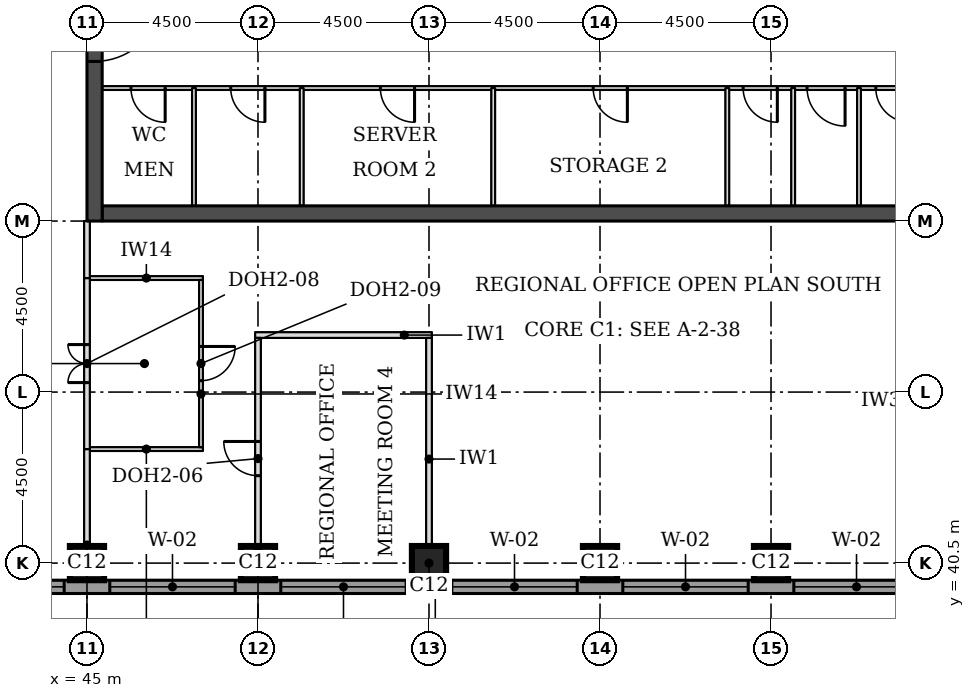
"""IFC4 building model, lengths in metres.
Left out: names, types, materials, properties, quantities, classifications, styles, units other than length and angle.
Written with IfcOpenShell. Run it as: python <this file> out.ifc"""

import sys

from ifc_helpers import new_model, si_unit, direction, frame, frame_2d, origin, origin_2d, place, context, subcontext, project, spatial, rectangle, extrude, element, fill, save


model = new_model("IFC4")
c1 = context("Model", 3, precision=1e-05, world=origin(), true_north=direction((0.0, 1.0)))
c2 = subcontext(c1, "Body", "Model", "MODEL_VIEW")
j1 = project(units=[si_unit("LENGTHUNIT", "METRE"), si_unit("PLANEANGLEUNIT", "RADIAN")], contexts=[c1])
p1 = place(None, origin())
s1 = spatial("IfcSite", under=j1, at=p1, CompositionType="ELEMENT")
p2 = place(p1, origin())
s2 = spatial("IfcBuilding", under=s1, at=p2, CompositionType="ELEMENT")
p3 = place(p2, frame((0.0, 0.0, 155.1)))
s3 = spatial("IfcBuildingStorey", under=s2, at=p3, CompositionType="ELEMENT", Elevation=155.1)
for number, where, z_axis, x_axis in (
    (1, (45.0, 40.5, 0.0), (0.0, 0.0, 1.0), (1.0, 0.0, 0.0)),
    (2, (49.5, 40.5, 0.0), (0.0, 0.0, 1.0), (1.0, 0.0, 0.0)),
    (3, (54.0, 40.5, 0.0), (0.0, 0.0, 1.0), (1.0, 0.0, 0.0)),
    (4, (58.5, 40.5, 0.0), (0.0, 0.0, 1.0), (1.0, 0.0, 0.0)),
    (5, (63.0, 40.5, 0.0), (0.0, 0.0, 1.0), (1.0, 0.0, 0.0)),
):
    element("IfcColumn", number, at=place(p3, frame(where, z_axis=z_axis, x_axis=x_axis)), inside=s3, PredefinedType="COLUMN", context=c2, shape_type="SweptSolid", body=[
        extrude(rectangle(XDim=0.9, YDim=0.9, at=origin_2d()), origin(), (0.0, 0.0, 1.0), 3.7),
    ])
p4 = place(p3, frame((45.4, 49.7, 0.0), z_axis=(0.0, 0.0, 1.0), x_axis=(1.0, 0.0, 0.0)))
e6 = element("IfcWall", 6, at=p4, inside=s3, PredefinedType="SHEAR", context=c2, shape_type="SweptSolid", body=[
    extrude(rectangle(XDim=21.7, YDim=0.4, at=frame_2d((10.85, 0.0))), origin(), (0.0, 0.0, 1.0), 3.7),
])
p5 = place(p3, frame((45.2, 49.5, 0.0), z_axis=(0.0, 0.0, 1.0), x_axis=(0.0, 1.0, 0.0)))
e7 = element("IfcWall", 7, at=p5, inside=s3, PredefinedType="SHEAR", context=c2, shape_type="SweptSolid", body=[
    extrude(rectangle(XDim=22.5, YDim=0.4, at=frame_2d((11.25, 0.0))), origin(), (0.0, 0.0, 1.0), 3.7),
])
p6 = place(p5, frame((4.2, 0.0, 0.0)))
e8 = element("IfcOpeningElement", 8, at=p6, cuts=e7, PredefinedType="OPENING", context=c2, shape_type="SweptSolid", body=[
    extrude(rectangle(XDim=1.8, YDim=2.1, at=frame_2d((0.9, 1.05))), frame((0.0, 0.21, 0.0), z_axis=(0.0, -1.0, 0.0), x_axis=(1.0, 0.0, 0.0)), (0.0, 0.0, 1.0), 0.42),
])
p7 = place(p5, frame((6.9, 0.0, 0.0)))
e9 = element("IfcOpeningElement", 9, at=p7, cuts=e7, PredefinedType="OPENING", context=c2, shape_type="SweptSolid", body=[
    extrude(rectangle(XDim=1.1, YDim=2.1, at=frame_2d((0.55, 1.05))), frame((0.0, 0.21, 0.0), z_axis=(0.0, -1.0, 0.0), x_axis=(1.0, 0.0, 0.0)), (0.0, 0.0, 1.0), 0.42),
])
p8 = place(p5, frame((13.6, 0.0, 0.0)))
e10 = element("IfcOpeningElement", 10, at=p8, cuts=e7, PredefinedType="OPENING", context=c2, shape_type="SweptSolid", body=[
    extrude(rectangle(XDim=1.1, YDim=2.1, at=frame_2d((0.55, 1.05))), frame((0.0, 0.21, 0.0), z_axis=(0.0, -1.0, 0.0), x_axis=(1.0, 0.0, 0.0)), (0.0, 0.0, 1.0), 0.42),
])
p9 = place(p5, frame((16.5, 0.0, 0.0)))
e11 = element("IfcOpeningElement", 11, at=p9, cuts=e7, PredefinedType="OPENING", context=c2, shape_type="SweptSolid", body=[
    extrude(rectangle(XDim=1.8, YDim=2.1, at=frame_2d((0.9, 1.05))), frame((0.0, 0.21, 0.0), z_axis=(0.0, -1.0, 0.0), x_axis=(1.0, 0.0, 0.0)), (0.0, 0.0, 1.0), 0.42),
])
p10 = place(p3, frame((36.0, 39.875, 0.0), z_axis=(0.0, 0.0, 1.0), x_axis=(1.0, 0.0, 0.0)))
e12 = element("IfcWall", 12, at=p10, inside=s3, PredefinedType="STANDARD", context=c2, shape_type="SweptSolid", body=[
    extrude(rectangle(XDim=36.331, YDim=0.35, at=frame_2d((18.166, 0.0))), origin(), (0.0, 0.0, 1.0), 3.525),
])
p11 = place(p10, frame((5.1, 0.0, 0.9)))
e13 = element("IfcOpeningElement", 13, at=p11, cuts=e12, PredefinedType="OPENING", context=c2, shape_type="SweptSolid", body=[
    extrude(rectangle(XDim=3.3, YDim=1.9, at=frame_2d((1.65, 0.95))), frame((0.0, 0.185, 0.0), z_axis=(0.0, -1.0, 0.0), x_axis=(1.0, 0.0, 0.0)), (0.0, 0.0, 1.0), 0.37),
])
p12 = place(p10, frame((9.6, 0.0, 0.9)))
e14 = element("IfcOpeningElement", 14, at=p12, cuts=e12, PredefinedType="OPENING", context=c2, shape_type="SweptSolid", body=[
    extrude(rectangle(XDim=3.3, YDim=1.9, at=frame_2d((1.65, 0.95))), frame((0.0, 0.185, 0.0), z_axis=(0.0, -1.0, 0.0), x_axis=(1.0, 0.0, 0.0)), (0.0, 0.0, 1.0), 0.37),
])
p13 = place(p10, frame((14.1, 0.0, 0.9)))
e15 = element("IfcOpeningElement", 15, at=p13, cuts=e12, PredefinedType="OPENING", context=c2, shape_type="SweptSolid", body=[
    extrude(rectangle(XDim=3.3, YDim=1.9, at=frame_2d((1.65, 0.95))), frame((0.0, 0.185, 0.0), z_axis=(0.0, -1.0, 0.0), x_axis=(1.0, 0.0, 0.0)), (0.0, 0.0, 1.0), 0.37),
])
p14 = place(p10, frame((18.6, 0.0, 0.9)))
e16 = element("IfcOpeningElement", 16, at=p14, cuts=e12, PredefinedType="OPENING", context=c2, shape_type="SweptSolid", body=[
    extrude(rectangle(XDim=3.3, YDim=1.9, at=frame_2d((1.65, 0.95))), frame((0.0, 0.185, 0.0), z_axis=(0.0, -1.0, 0.0), x_axis=(1.0, 0.0, 0.0)), (0.0, 0.0, 1.0), 0.37),
])
p15 = place(p10, frame((23.1, 0.0, 0.9)))
e17 = element("IfcOpeningElement", 17, at=p15, cuts=e12, PredefinedType="OPENING", context=c2, shape_type="SweptSolid", body=[
    extrude(rectangle(XDim=3.3, YDim=1.9, at=frame_2d((1.65, 0.95))), frame((0.0, 0.185, 0.0), z_axis=(0.0, -1.0, 0.0), x_axis=(1.0, 0.0, 0.0)), (0.0, 0.0, 1.0), 0.37),
])
p16 = place(p10, frame((27.6, 0.0, 0.9)))
e18 = element("IfcOpeningElement", 18, at=p16, cuts=e12, PredefinedType="OPENING", context=c2, shape_type="SweptSolid", body=[
    extrude(rectangle(XDim=3.3, YDim=1.9, at=frame_2d((1.65, 0.95))), frame((0.0, 0.185, 0.0), z_axis=(0.0, -1.0, 0.0), x_axis=(1.0, 0.0, 0.0)), (0.0, 0.0, 1.0), 0.37),
])
p17 = place(p3, frame((45.075, 43.5, 0.0), z_axis=(0.0, 0.0, 1.0), x_axis=(1.0, 0.0, 0.0)))
e19 = element("IfcWall", 19, at=p17, inside=s3, PredefinedType="PARTITIONING", context=c2, shape_type="SweptSolid", body=[
    extrude(rectangle(XDim=2.975, YDim=0.1, at=frame_2d((1.488, 0.0))), origin(), (0.0, 0.0, 1.0), 3.55),
])
p18 = place(p3, frame((49.425, 46.5, 0.0), z_axis=(0.0, 0.0, 1.0), x_axis=(1.0, 0.0, 0.0)))
e20 = element("IfcWall", 20, at=p18, inside=s3, PredefinedType="PARTITIONING", context=c2, shape_type="SweptSolid", body=[
    extrude(rectangle(XDim=4.65, YDim=0.15, at=frame_2d((2.325, 0.0))), origin(), (0.0, 0.0, 1.0), 3.55),
])
p19 = place(p3, frame((45.075, 48.0, 0.0), z_axis=(0.0, 0.0, 1.0), x_axis=(1.0, 0.0, 0.0)))
e21 = element("IfcWall", 21, at=p19, inside=s3, PredefinedType="PARTITIONING", context=c2, shape_type="SweptSolid", body=[
    extrude(rectangle(XDim=2.975, YDim=0.1, at=frame_2d((1.488, 0.0))), origin(), (0.0, 0.0, 1.0), 3.55),
])
p20 = place(p3, frame((45.0, 40.05, 0.0), z_axis=(0.0, 0.0, 1.0), x_axis=(0.0, 1.0, 0.0)))
e22 = element("IfcWall", 22, at=p20, inside=s3, PredefinedType="PARTITIONING", context=c2, shape_type="SweptSolid", body=[
    extrude(rectangle(XDim=3.45, YDim=0.15, at=frame_2d((1.725, 0.0))), origin(), (0.0, 0.0, 1.0), 3.022),
])
p21 = place(p3, frame((49.5, 40.05, 0.0), z_axis=(0.0, 0.0, 1.0), x_axis=(0.0, 1.0, 0.0)))
e23 = element("IfcWall", 23, at=p21, inside=s3, PredefinedType="PARTITIONING", context=c2, shape_type="SweptSolid", body=[
    extrude(rectangle(XDim=6.375, YDim=0.15, at=frame_2d((3.188, 0.0))), origin(), (0.0, 0.0, 1.0), 3.55),
])
p22 = place(p21, frame((2.75, 0.0, 0.0)))
e24 = element("IfcOpeningElement", 24, at=p22, cuts=e23, PredefinedType="OPENING", context=c2, shape_type="SweptSolid", body=[
    extrude(rectangle(XDim=0.9, YDim=2.1, at=frame_2d((0.45, 1.05))), frame((0.0, 0.085, 0.0), z_axis=(0.0, -1.0, 0.0), x_axis=(1.0, 0.0, 0.0)), (0.0, 0.0, 1.0), 0.17),
])
p23 = place(p3, frame((54.0, 40.05, 0.0), z_axis=(0.0, 0.0, 1.0), x_axis=(0.0, 1.0, 0.0)))
e25 = element("IfcWall", 25, at=p23, inside=s3, PredefinedType="PARTITIONING", context=c2, shape_type="SweptSolid", body=[
    extrude(rectangle(XDim=6.375, YDim=0.15, at=frame_2d((3.188, 0.0))), origin(), (0.0, 0.0, 1.0), 3.55),
])
p24 = place(p3, frame((45.0, 43.5, 0.0), z_axis=(0.0, 0.0, 1.0), x_axis=(0.0, 1.0, 0.0)))
e26 = element("IfcWall", 26, at=p24, inside=s3, PredefinedType="PARTITIONING", context=c2, shape_type="SweptSolid", body=[
    extrude(rectangle(XDim=4.5, YDim=0.15, at=frame_2d((2.25, 0.0))), origin(), (0.0, 0.0, 1.0), 3.022),
])
p25 = place(p24, frame((1.75, 0.0, 0.0)))
e27 = element("IfcOpeningElement", 27, at=p25, cuts=e26, PredefinedType="OPENING", context=c2, shape_type="SweptSolid", body=[
    extrude(rectangle(XDim=1.0, YDim=2.1, at=frame_2d((0.5, 1.05))), frame((0.0, 0.085, 0.0), z_axis=(0.0, -1.0, 0.0), x_axis=(1.0, 0.0, 0.0)), (0.0, 0.0, 1.0), 0.17),
])
p26 = place(p3, frame((48.0, 43.55, 0.0), z_axis=(0.0, 0.0, 1.0), x_axis=(0.0, 1.0, 0.0)))
e28 = element("IfcWall", 28, at=p26, inside=s3, PredefinedType="PARTITIONING", context=c2, shape_type="SweptSolid", body=[
    extrude(rectangle(XDim=4.4, YDim=0.1, at=frame_2d((2.2, 0.0))), origin(), (0.0, 0.0, 1.0), 3.55),
])
p27 = place(p26, frame((1.75, 0.0, 0.0)))
e29 = element("IfcOpeningElement", 29, at=p27, cuts=e28, PredefinedType="OPENING", context=c2, shape_type="SweptSolid", body=[
    extrude(rectangle(XDim=0.9, YDim=2.1, at=frame_2d((0.45, 1.05))), frame((0.0, 0.06, 0.0), z_axis=(0.0, -1.0, 0.0), x_axis=(1.0, 0.0, 0.0)), (0.0, 0.0, 1.0), 0.12),
])
p28 = place(p3, frame((45.0, 48.0, 0.0), z_axis=(0.0, 0.0, 1.0), x_axis=(0.0, 1.0, 0.0)))
e30 = element("IfcWall", 30, at=p28, inside=s3, PredefinedType="PARTITIONING", context=c2, shape_type="SweptSolid", body=[
    extrude(rectangle(XDim=1.5, YDim=0.15, at=frame_2d((0.75, 0.0))), origin(), (0.0, 0.0, 1.0), 3.022),
])
p29 = place(p3, frame((45.4, 53.0, 0.0), z_axis=(0.0, 0.0, 1.0), x_axis=(1.0, 0.0, 0.0)))
e31 = element("IfcWall", 31, at=p29, inside=s3, PredefinedType="PARTITIONING", context=c2, shape_type="SweptSolid", body=[
    extrude(rectangle(XDim=21.7, YDim=0.1, at=frame_2d((10.85, 0.0))), origin(), (0.0, 0.0, 1.0), 3.55),
])
p30 = place(p29, frame((20.357, 0.0, 0.0)))
e32 = element("IfcOpeningElement", 32, at=p30, cuts=e31, PredefinedType="OPENING", context=c2, shape_type="SweptSolid", body=[
    extrude(rectangle(XDim=0.9, YDim=2.1, at=frame_2d((0.45, 1.05))), frame((0.0, 0.06, 0.0), z_axis=(0.0, -1.0, 0.0), x_axis=(1.0, 0.0, 0.0)), (0.0, 0.0, 1.0), 0.12),
])
p31 = place(p29, frame((18.549, 0.0, 0.0)))
e33 = element("IfcOpeningElement", 33, at=p31, cuts=e31, PredefinedType="OPENING", context=c2, shape_type="SweptSolid", body=[
    extrude(rectangle(XDim=1.0, YDim=2.1, at=frame_2d((0.5, 1.05))), frame((0.0, 0.06, 0.0), z_axis=(0.0, -1.0, 0.0), x_axis=(1.0, 0.0, 0.0)), (0.0, 0.0, 1.0), 0.12),
])
p32 = place(p29, frame((16.866, 0.0, 0.0)))
e34 = element("IfcOpeningElement", 34, at=p32, cuts=e31, PredefinedType="OPENING", context=c2, shape_type="SweptSolid", body=[
    extrude(rectangle(XDim=0.9, YDim=2.1, at=frame_2d((0.45, 1.05))), frame((0.0, 0.06, 0.0), z_axis=(0.0, -1.0, 0.0), x_axis=(1.0, 0.0, 0.0)), (0.0, 0.0, 1.0), 0.12),
])
p33 = place(p29, frame((0.758, 0.0, 0.0)))
e35 = element("IfcOpeningElement", 35, at=p33, cuts=e31, PredefinedType="OPENING", context=c2, shape_type="SweptSolid", body=[
    extrude(rectangle(XDim=0.9, YDim=2.1, at=frame_2d((0.45, 1.05))), frame((0.0, 0.06, 0.0), z_axis=(0.0, -1.0, 0.0), x_axis=(1.0, 0.0, 0.0)), (0.0, 0.0, 1.0), 0.12),
])
p34 = place(p29, frame((3.383, 0.0, 0.0)))
e36 = element("IfcOpeningElement", 36, at=p34, cuts=e31, PredefinedType="OPENING", context=c2, shape_type="SweptSolid", body=[
    extrude(rectangle(XDim=0.9, YDim=2.1, at=frame_2d((0.45, 1.05))), frame((0.0, 0.06, 0.0), z_axis=(0.0, -1.0, 0.0), x_axis=(1.0, 0.0, 0.0)), (0.0, 0.0, 1.0), 0.12),
])
p35 = place(p29, frame((7.32, 0.0, 0.0)))
e37 = element("IfcOpeningElement", 37, at=p35, cuts=e31, PredefinedType="OPENING", context=c2, shape_type="SweptSolid", body=[
    extrude(rectangle(XDim=0.9, YDim=2.1, at=frame_2d((0.45, 1.05))), frame((0.0, 0.06, 0.0), z_axis=(0.0, -1.0, 0.0), x_axis=(1.0, 0.0, 0.0)), (0.0, 0.0, 1.0), 0.12),
])
p36 = place(p29, frame((12.92, 0.0, 0.0)))
e38 = element("IfcOpeningElement", 38, at=p36, cuts=e31, PredefinedType="OPENING", context=c2, shape_type="SweptSolid", body=[
    extrude(rectangle(XDim=0.9, YDim=2.1, at=frame_2d((0.45, 1.05))), frame((0.0, 0.06, 0.0), z_axis=(0.0, -1.0, 0.0), x_axis=(1.0, 0.0, 0.0)), (0.0, 0.0, 1.0), 0.12),
])
for number, where, z_axis, x_axis in (
    (39, (47.815, 49.9, 0.0), (0.0, 0.0, 1.0), (0.0, 1.0, 0.0)),
    (40, (50.65, 49.9, 0.0), (0.0, 0.0, 1.0), (0.0, 1.0, 0.0)),
    (41, (55.69, 49.9, 0.0), (0.0, 0.0, 1.0), (0.0, 1.0, 0.0)),
    (42, (61.85, 49.9, 0.0), (0.0, 0.0, 1.0), (0.0, 1.0, 0.0)),
    (43, (63.583, 49.9, 0.0), (0.0, 0.0, 1.0), (0.0, 1.0, 0.0)),
    (44, (65.315, 49.9, 0.0), (0.0, 0.0, 1.0), (0.0, 1.0, 0.0)),
):
    element("IfcWall", number, at=place(p3, frame(where, z_axis=z_axis, x_axis=x_axis)), inside=s3, PredefinedType="PARTITIONING", context=c2, shape_type="SweptSolid", body=[
        extrude(rectangle(XDim=3.1, YDim=0.1, at=frame_2d((1.55, 0.0))), origin(), (0.0, 0.0, 1.0), 3.55),
    ])
p37 = place(p11, origin())
e45 = element("IfcWindow", 45, at=p37, inside=s3, PartitioningType="SINGLE_PANEL", PredefinedType="WINDOW", context=c2, shape_type="SweptSolid", body=[
    extrude(rectangle(XDim=3.3, YDim=1.9, at=frame_2d((1.65, 0.95))), frame((0.0, 0.085, 0.0), z_axis=(0.0, -1.0, 0.0), x_axis=(1.0, 0.0, 0.0)), (0.0, 0.0, 1.0), 0.06),
])
fill(e13, e45)
p38 = place(p12, origin())
e46 = element("IfcWindow", 46, at=p38, inside=s3, PartitioningType="SINGLE_PANEL", PredefinedType="WINDOW", context=c2, shape_type="SweptSolid", body=[
    extrude(rectangle(XDim=3.3, YDim=1.9, at=frame_2d((1.65, 0.95))), frame((0.0, 0.085, 0.0), z_axis=(0.0, -1.0, 0.0), x_axis=(1.0, 0.0, 0.0)), (0.0, 0.0, 1.0), 0.06),
])
fill(e14, e46)
p39 = place(p13, origin())
e47 = element("IfcWindow", 47, at=p39, inside=s3, PartitioningType="SINGLE_PANEL", PredefinedType="WINDOW", context=c2, shape_type="SweptSolid", body=[
    extrude(rectangle(XDim=3.3, YDim=1.9, at=frame_2d((1.65, 0.95))), frame((0.0, 0.085, 0.0), z_axis=(0.0, -1.0, 0.0), x_axis=(1.0, 0.0, 0.0)), (0.0, 0.0, 1.0), 0.06),
])
fill(e15, e47)
p40 = place(p14, origin())
e48 = element("IfcWindow", 48, at=p40, inside=s3, PartitioningType="SINGLE_PANEL", PredefinedType="WINDOW", context=c2, shape_type="SweptSolid", body=[
    extrude(rectangle(XDim=3.3, YDim=1.9, at=frame_2d((1.65, 0.95))), frame((0.0, 0.085, 0.0), z_axis=(0.0, -1.0, 0.0), x_axis=(1.0, 0.0, 0.0)), (0.0, 0.0, 1.0), 0.06),
])
fill(e16, e48)
p41 = place(p15, origin())
e49 = element("IfcWindow", 49, at=p41, inside=s3, PartitioningType="SINGLE_PANEL", PredefinedType="WINDOW", context=c2, shape_type="SweptSolid", body=[
    extrude(rectangle(XDim=3.3, YDim=1.9, at=frame_2d((1.65, 0.95))), frame((0.0, 0.085, 0.0), z_axis=(0.0, -1.0, 0.0), x_axis=(1.0, 0.0, 0.0)), (0.0, 0.0, 1.0), 0.06),
])
fill(e17, e49)
p42 = place(p16, origin())
e50 = element("IfcWindow", 50, at=p42, inside=s3, PartitioningType="SINGLE_PANEL", PredefinedType="WINDOW", context=c2, shape_type="SweptSolid", body=[
    extrude(rectangle(XDim=3.3, YDim=1.9, at=frame_2d((1.65, 0.95))), frame((0.0, 0.085, 0.0), z_axis=(0.0, -1.0, 0.0), x_axis=(1.0, 0.0, 0.0)), (0.0, 0.0, 1.0), 0.06),
])
fill(e18, e50)
p43 = place(p25, origin())
e51 = element("IfcDoor", 51, at=p43, inside=s3, OperationType="DOUBLE_DOOR_SINGLE_SWING", PredefinedType="DOOR", context=c2, shape_type="SweptSolid", body=[
    extrude(rectangle(XDim=1.0, YDim=2.1, at=frame_2d((0.5, 1.05))), frame((0.0, 0.025, 0.0), z_axis=(0.0, -1.0, 0.0), x_axis=(1.0, 0.0, 0.0)), (0.0, 0.0, 1.0), 0.05),
])
fill(e27, e51)
p44 = place(p27, frame((0.9, 0.0, 0.0), z_axis=(0.0, 0.0, 1.0), x_axis=(-1.0, 0.0, 0.0)))
e52 = element("IfcDoor", 52, at=p44, inside=s3, OperationType="SINGLE_SWING_LEFT", PredefinedType="DOOR", context=c2, shape_type="SweptSolid", body=[
    extrude(rectangle(XDim=0.9, YDim=2.1, at=frame_2d((0.45, 1.05))), frame((0.0, 0.025, 0.0), z_axis=(0.0, -1.0, 0.0), x_axis=(1.0, 0.0, 0.0)), (0.0, 0.0, 1.0), 0.05),
])
fill(e29, e52)
p45 = place(p22, origin())
e53 = element("IfcDoor", 53, at=p45, inside=s3, OperationType="SINGLE_SWING_RIGHT", PredefinedType="DOOR", context=c2, shape_type="SweptSolid", body=[
    extrude(rectangle(XDim=0.9, YDim=2.1, at=frame_2d((0.45, 1.05))), frame((0.0, 0.025, 0.0), z_axis=(0.0, -1.0, 0.0), x_axis=(1.0, 0.0, 0.0)), (0.0, 0.0, 1.0), 0.05),
])
fill(e24, e53)
p46 = place(p6, frame((1.8, 0.0, 0.0), z_axis=(0.0, 0.0, 1.0), x_axis=(-1.0, 0.0, 0.0)))
e54 = element("IfcDoor", 54, at=p46, inside=s3, OperationType="SINGLE_SWING_LEFT", PredefinedType="DOOR", context=c2, shape_type="SweptSolid", body=[
    extrude(rectangle(XDim=1.8, YDim=2.1, at=frame_2d((0.9, 1.05))), frame((0.0, 0.025, 0.0), z_axis=(0.0, -1.0, 0.0), x_axis=(1.0, 0.0, 0.0)), (0.0, 0.0, 1.0), 0.05),
])
fill(e8, e54)
p47 = place(p30, frame((0.9, 0.0, 0.0), z_axis=(0.0, 0.0, 1.0), x_axis=(-1.0, 0.0, 0.0)))
e55 = element("IfcDoor", 55, at=p47, inside=s3, OperationType="SINGLE_SWING_LEFT", PredefinedType="DOOR", context=c2, shape_type="SweptSolid", body=[
    extrude(rectangle(XDim=0.9, YDim=2.1, at=frame_2d((0.45, 1.05))), frame((0.0, 0.025, 0.0), z_axis=(0.0, -1.0, 0.0), x_axis=(1.0, 0.0, 0.0)), (0.0, 0.0, 1.0), 0.05),
])
fill(e32, e55)
p48 = place(p31, frame((1.0, 0.0, 0.0), z_axis=(0.0, 0.0, 1.0), x_axis=(-1.0, 0.0, 0.0)))
e56 = element("IfcDoor", 56, at=p48, inside=s3, OperationType="SINGLE_SWING_LEFT", PredefinedType="DOOR", context=c2, shape_type="SweptSolid", body=[
    extrude(rectangle(XDim=1.0, YDim=2.1, at=frame_2d((0.5, 1.05))), frame((0.0, 0.025, 0.0), z_axis=(0.0, -1.0, 0.0), x_axis=(1.0, 0.0, 0.0)), (0.0, 0.0, 1.0), 0.05),
])
fill(e33, e56)
p49 = place(p32, frame((0.9, 0.0, 0.0), z_axis=(0.0, 0.0, 1.0), x_axis=(-1.0, 0.0, 0.0)))
e57 = element("IfcDoor", 57, at=p49, inside=s3, OperationType="SINGLE_SWING_LEFT", PredefinedType="DOOR", context=c2, shape_type="SweptSolid", body=[
    extrude(rectangle(XDim=0.9, YDim=2.1, at=frame_2d((0.45, 1.05))), frame((0.0, 0.025, 0.0), z_axis=(0.0, -1.0, 0.0), x_axis=(1.0, 0.0, 0.0)), (0.0, 0.0, 1.0), 0.05),
])
fill(e34, e57)
p50 = place(p33, frame((0.9, 0.0, 0.0), z_axis=(0.0, 0.0, 1.0), x_axis=(-1.0, 0.0, 0.0)))
e58 = element("IfcDoor", 58, at=p50, inside=s3, OperationType="SINGLE_SWING_LEFT", PredefinedType="DOOR", context=c2, shape_type="SweptSolid", body=[
    extrude(rectangle(XDim=0.9, YDim=2.1, at=frame_2d((0.45, 1.05))), frame((0.0, 0.025, 0.0), z_axis=(0.0, -1.0, 0.0), x_axis=(1.0, 0.0, 0.0)), (0.0, 0.0, 1.0), 0.05),
])
fill(e35, e58)
p51 = place(p34, frame((0.9, 0.0, 0.0), z_axis=(0.0, 0.0, 1.0), x_axis=(-1.0, 0.0, 0.0)))
e59 = element("IfcDoor", 59, at=p51, inside=s3, OperationType="SINGLE_SWING_LEFT", PredefinedType="DOOR", context=c2, shape_type="SweptSolid", body=[
    extrude(rectangle(XDim=0.9, YDim=2.1, at=frame_2d((0.45, 1.05))), frame((0.0, 0.025, 0.0), z_axis=(0.0, -1.0, 0.0), x_axis=(1.0, 0.0, 0.0)), (0.0, 0.0, 1.0), 0.05),
])
fill(e36, e59)
p52 = place(p35, frame((0.9, 0.0, 0.0), z_axis=(0.0, 0.0, 1.0), x_axis=(-1.0, 0.0, 0.0)))
e60 = element("IfcDoor", 60, at=p52, inside=s3, OperationType="SINGLE_SWING_LEFT", PredefinedType="DOOR", context=c2, shape_type="SweptSolid", body=[
    extrude(rectangle(XDim=0.9, YDim=2.1, at=frame_2d((0.45, 1.05))), frame((0.0, 0.025, 0.0), z_axis=(0.0, -1.0, 0.0), x_axis=(1.0, 0.0, 0.0)), (0.0, 0.0, 1.0), 0.05),
])
fill(e37, e60)
p53 = place(p36, frame((0.9, 0.0, 0.0), z_axis=(0.0, 0.0, 1.0), x_axis=(-1.0, 0.0, 0.0)))
e61 = element("IfcDoor", 61, at=p53, inside=s3, OperationType="SINGLE_SWING_LEFT", PredefinedType="DOOR", context=c2, shape_type="SweptSolid", body=[
    extrude(rectangle(XDim=0.9, YDim=2.1, at=frame_2d((0.45, 1.05))), frame((0.0, 0.025, 0.0), z_axis=(0.0, -1.0, 0.0), x_axis=(1.0, 0.0, 0.0)), (0.0, 0.0, 1.0), 0.05),
])
fill(e38, e61)
save(model, sys.argv[1])
